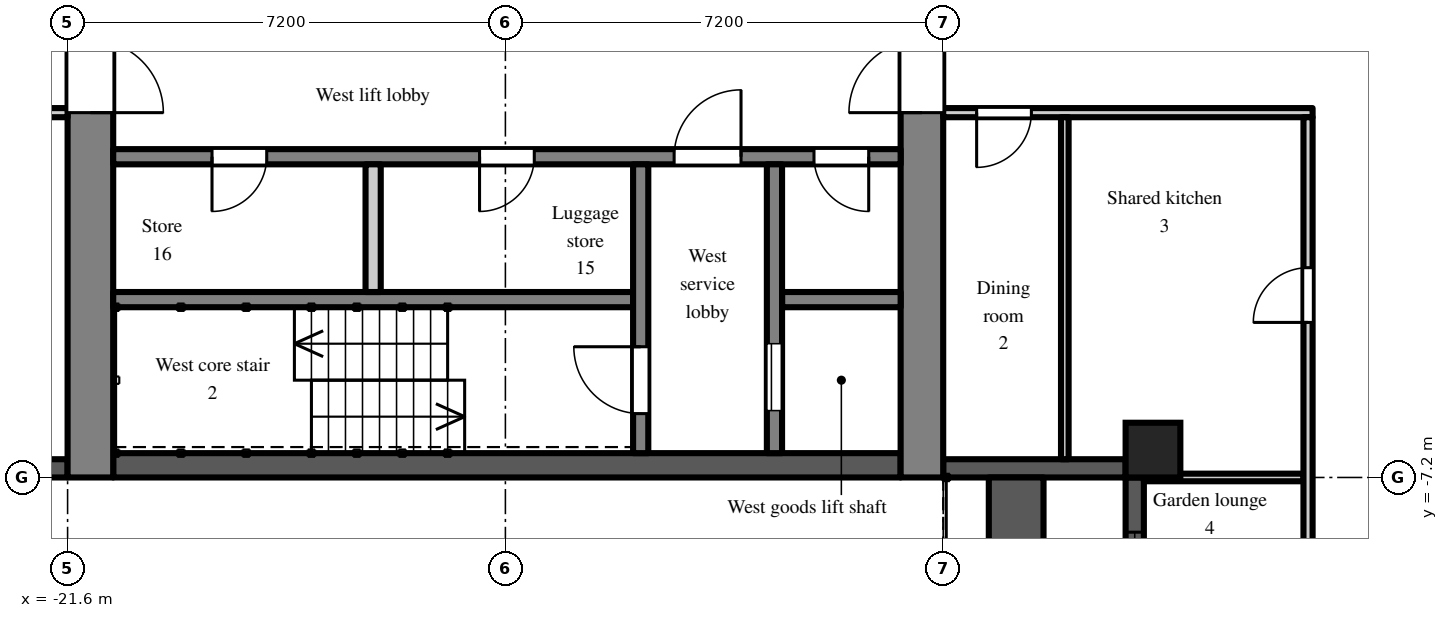
"""IFC4 building model, lengths in metres.
Left out: names, types, materials, properties, quantities, classifications, styles, units other than length and angle.
Written with IfcOpenShell. Run it as: python <this file> out.ifc"""

import sys

from ifc_helpers import new_model, si_unit, direction, frame, frame_2d, origin, origin_2d, place, context, subcontext, project, spatial, rectangle, extrude, element, fill, save


model = new_model("IFC4")
c1 = context("Model", 3, precision=1e-05, world=origin(), true_north=direction((0.0, 1.0)))
c2 = subcontext(c1, "Body", "Model", "MODEL_VIEW")
j1 = project(units=[si_unit("LENGTHUNIT", "METRE"), si_unit("PLANEANGLEUNIT", "RADIAN")], contexts=[c1])
p1 = place(None, origin())
s1 = spatial("IfcSite", under=j1, at=p1, CompositionType="ELEMENT")
p2 = place(p1, origin())
s2 = spatial("IfcBuilding", under=s1, at=p2, CompositionType="ELEMENT")
p3 = place(p2, frame((0.0, 0.0, 225.9)))
s3 = spatial("IfcBuildingStorey", under=s2, at=p3, CompositionType="ELEMENT", Elevation=225.9)
p4 = place(p3, frame((-3.75, -6.75, 0.0), z_axis=(0.0, 0.0, 1.0), x_axis=(1.0, 0.0, 0.0)))
e1 = element("IfcColumn", 1, at=p4, inside=s3, PredefinedType="COLUMN", context=c2, shape_type="SweptSolid", body=[
    extrude(rectangle(XDim=0.9, YDim=0.9, at=origin_2d()), origin(), (0.0, 0.0, 1.0), 3.0),
])
p5 = place(p3, frame((-24.3, -7.05, 0.0), z_axis=(0.0, 0.0, 1.0), x_axis=(1.0, 0.0, 0.0)))
e2 = element("IfcWall", 2, at=p5, inside=s3, PredefinedType="SOLIDWALL", context=c2, shape_type="SweptSolid", body=[
    extrude(rectangle(XDim=2.7, YDim=0.3, at=frame_2d((1.35, 0.0))), origin(), (0.0, 0.0, 1.0), 2.3),
])
p6 = place(p5, frame((0.75, 0.0, 0.2)))
e3 = element("IfcOpeningElement", 3, at=p6, cuts=e2, PredefinedType="OPENING", context=c2, shape_type="SweptSolid", body=[
    extrude(rectangle(XDim=1.2, YDim=1.85, at=frame_2d((0.6, 0.925))), frame((0.0, 0.16, 0.0), z_axis=(0.0, -1.0, 0.0), x_axis=(1.0, 0.0, 0.0)), (0.0, 0.0, 1.0), 0.32),
])
p7 = place(p3, frame((-7.2, -7.05, 0.0), z_axis=(0.0, 0.0, 1.0), x_axis=(1.0, 0.0, 0.0)))
e4 = element("IfcWall", 4, at=p7, inside=s3, PredefinedType="SOLIDWALL", context=c2, shape_type="SweptSolid", body=[
    extrude(rectangle(XDim=3.0, YDim=0.3, at=frame_2d((1.5, 0.0))), origin(), (0.0, 0.0, 1.0), 2.3),
])
p8 = place(p3, frame((-4.05, -7.2, 0.0), z_axis=(0.0, 0.0, 1.0), x_axis=(0.0, -1.0, 0.0)))
e5 = element("IfcWall", 5, at=p8, inside=s3, PredefinedType="SOLIDWALL", context=c2, shape_type="SweptSolid", body=[
    extrude(rectangle(XDim=7.2, YDim=0.3, at=frame_2d((3.6, 0.0))), origin(), (0.0, 0.0, 1.0), 2.3),
])
p9 = place(p8, frame((3.0, 0.0, 0.0)))
e6 = element("IfcOpeningElement", 6, at=p9, cuts=e5, PredefinedType="OPENING", context=c2, shape_type="SweptSolid", body=[
    extrude(rectangle(XDim=1.2, YDim=2.05, at=frame_2d((0.6, 1.025))), frame((0.0, 0.16, 0.0), z_axis=(0.0, -1.0, 0.0), x_axis=(1.0, 0.0, 0.0)), (0.0, 0.0, 1.0), 0.32),
])
p10 = place(p8, frame((0.9, 0.0, 0.2)))
e7 = element("IfcOpeningElement", 7, at=p10, cuts=e5, PredefinedType="OPENING", context=c2, shape_type="SweptSolid", body=[
    extrude(rectangle(XDim=1.8, YDim=1.85, at=frame_2d((0.9, 0.925))), frame((0.0, 0.16, 0.0), z_axis=(0.0, -1.0, 0.0), x_axis=(1.0, 0.0, 0.0)), (0.0, 0.0, 1.0), 0.32),
])
p11 = place(p8, frame((4.5, 0.0, 0.2)))
e8 = element("IfcOpeningElement", 8, at=p11, cuts=e5, PredefinedType="OPENING", context=c2, shape_type="SweptSolid", body=[
    extrude(rectangle(XDim=1.8, YDim=1.85, at=frame_2d((0.9, 0.925))), frame((0.0, 0.16, 0.0), z_axis=(0.0, -1.0, 0.0), x_axis=(1.0, 0.0, 0.0)), (0.0, 0.0, 1.0), 0.32),
])
p12 = place(p3, frame((-6.0, -14.4, 0.0), z_axis=(0.0, 0.0, 1.0), x_axis=(0.0, 1.0, 0.0)))
e9 = element("IfcWall", 9, at=p12, inside=s3, PredefinedType="PARAPET", context=c2, shape_type="SweptSolid", body=[
    extrude(rectangle(XDim=7.2, YDim=0.9, at=frame_2d((3.6, 0.0))), origin(), (0.0, 0.0, 1.0), 0.8),
])
p13 = place(p3, frame((-7.55, -7.2, 0.0), z_axis=(0.0, 0.0, 1.0), x_axis=(0.0, 1.0, 0.0)))
e10 = element("IfcWall", 10, at=p13, inside=s3, PredefinedType="SHEAR", context=c2, shape_type="SweptSolid", body=[
    extrude(rectangle(XDim=14.4, YDim=0.7, at=frame_2d((7.2, 0.0))), origin(), (0.0, 0.0, 1.0), 2.6),
])
p14 = place(p13, frame((6.0, 0.0, 0.0)))
e11 = element("IfcOpeningElement", 11, at=p14, cuts=e10, PredefinedType="OPENING", context=c2, shape_type="SweptSolid", body=[
    extrude(rectangle(XDim=2.4, YDim=2.2, at=frame_2d((1.2, 1.1))), frame((0.0, 0.36, 0.0), z_axis=(0.0, -1.0, 0.0), x_axis=(1.0, 0.0, 0.0)), (0.0, 0.0, 1.0), 0.72),
])
p15 = place(p3, frame((-21.225, -7.2, 0.0), z_axis=(0.0, 0.0, 1.0), x_axis=(0.0, 1.0, 0.0)))
e12 = element("IfcWall", 12, at=p15, inside=s3, PredefinedType="SHEAR", context=c2, shape_type="SweptSolid", body=[
    extrude(rectangle(XDim=14.4, YDim=0.75, at=frame_2d((7.2, 0.0))), origin(), (0.0, 0.0, 1.0), 2.6),
])
p16 = place(p15, frame((6.0, 0.0, 0.0)))
e13 = element("IfcOpeningElement", 13, at=p16, cuts=e12, PredefinedType="OPENING", context=c2, shape_type="SweptSolid", body=[
    extrude(rectangle(XDim=2.4, YDim=2.2, at=frame_2d((1.2, 1.1))), frame((0.0, 0.385, 0.0), z_axis=(0.0, -1.0, 0.0), x_axis=(1.0, 0.0, 0.0)), (0.0, 0.0, 1.0), 0.77),
])
p17 = place(p3, frame((-7.9, -7.0, 0.0), z_axis=(0.0, 0.0, 1.0), x_axis=(-1.0, 0.0, 0.0)))
e14 = element("IfcWall", 14, at=p17, inside=s3, PredefinedType="SHEAR", context=c2, shape_type="SweptSolid", body=[
    extrude(rectangle(XDim=12.95, YDim=0.4, at=frame_2d((6.475, 0.0))), origin(), (0.0, 0.0, 1.0), 2.6),
])
p18 = place(p3, frame((-7.9, -1.925, 0.0), z_axis=(0.0, 0.0, 1.0), x_axis=(-1.0, 0.0, 0.0)))
e15 = element("IfcWall", 15, at=p18, inside=s3, PredefinedType="SHEAR", context=c2, shape_type="SweptSolid", body=[
    extrude(rectangle(XDim=12.95, YDim=0.25, at=frame_2d((6.475, 0.0))), origin(), (0.0, 0.0, 1.0), 2.6),
])
p19 = place(p18, frame((0.525, 0.0, 0.0)))
e16 = element("IfcOpeningElement", 16, at=p19, cuts=e15, PredefinedType="OPENING", context=c2, shape_type="SweptSolid", body=[
    extrude(rectangle(XDim=0.9, YDim=2.1, at=frame_2d((0.45, 1.05))), frame((0.0, 0.135, 0.0), z_axis=(0.0, -1.0, 0.0), x_axis=(1.0, 0.0, 0.0)), (0.0, 0.0, 1.0), 0.27),
])
p20 = place(p18, frame((2.625, 0.0, 0.0)))
e17 = element("IfcOpeningElement", 17, at=p20, cuts=e15, PredefinedType="OPENING", context=c2, shape_type="SweptSolid", body=[
    extrude(rectangle(XDim=1.1, YDim=2.1, at=frame_2d((0.55, 1.05))), frame((0.0, 0.135, 0.0), z_axis=(0.0, -1.0, 0.0), x_axis=(1.0, 0.0, 0.0)), (0.0, 0.0, 1.0), 0.27),
])
p21 = place(p18, frame((6.025, 0.0, 0.0)))
e18 = element("IfcOpeningElement", 18, at=p21, cuts=e15, PredefinedType="OPENING", context=c2, shape_type="SweptSolid", body=[
    extrude(rectangle(XDim=0.9, YDim=2.1, at=frame_2d((0.45, 1.05))), frame((0.0, 0.135, 0.0), z_axis=(0.0, -1.0, 0.0), x_axis=(1.0, 0.0, 0.0)), (0.0, 0.0, 1.0), 0.27),
])
p22 = place(p18, frame((10.425, 0.0, 0.0)))
e19 = element("IfcOpeningElement", 19, at=p22, cuts=e15, PredefinedType="OPENING", context=c2, shape_type="SweptSolid", body=[
    extrude(rectangle(XDim=0.9, YDim=2.1, at=frame_2d((0.45, 1.05))), frame((0.0, 0.135, 0.0), z_axis=(0.0, -1.0, 0.0), x_axis=(1.0, 0.0, 0.0)), (0.0, 0.0, 1.0), 0.27),
])
p23 = place(p3, frame((-7.9, -4.275, 0.0), z_axis=(0.0, 0.0, 1.0), x_axis=(-1.0, 0.0, 0.0)))
e20 = element("IfcWall", 20, at=p23, inside=s3, PredefinedType="SHEAR", context=c2, shape_type="SweptSolid", body=[
    extrude(rectangle(XDim=1.95, YDim=0.25, at=frame_2d((0.975, 0.0))), origin(), (0.0, 0.0, 1.0), 2.6),
])
p24 = place(p3, frame((-12.3, -4.275, 0.0), z_axis=(0.0, 0.0, 1.0), x_axis=(-1.0, 0.0, 0.0)))
e21 = element("IfcWall", 21, at=p24, inside=s3, PredefinedType="SHEAR", context=c2, shape_type="SweptSolid", body=[
    extrude(rectangle(XDim=8.55, YDim=0.25, at=frame_2d((4.275, 0.0))), origin(), (0.0, 0.0, 1.0), 2.6),
])
p25 = place(p3, frame((-9.975, -2.05, 0.0), z_axis=(0.0, 0.0, 1.0), x_axis=(0.0, -1.0, 0.0)))
e22 = element("IfcWall", 22, at=p25, inside=s3, PredefinedType="SHEAR", context=c2, shape_type="SweptSolid", body=[
    extrude(rectangle(XDim=4.75, YDim=0.25, at=frame_2d((2.375, 0.0))), origin(), (0.0, 0.0, 1.0), 2.6),
])
p26 = place(p25, frame((2.95, 0.0, 0.0)))
e23 = element("IfcOpeningElement", 23, at=p26, cuts=e22, PredefinedType="OPENING", context=c2, shape_type="SweptSolid", body=[
    extrude(rectangle(XDim=1.1, YDim=2.1, at=frame_2d((0.55, 1.05))), frame((0.0, 0.135, 0.0), z_axis=(0.0, -1.0, 0.0), x_axis=(1.0, 0.0, 0.0)), (0.0, 0.0, 1.0), 0.27),
])
p27 = place(p3, frame((-12.175, -2.05, 0.0), z_axis=(0.0, 0.0, 1.0), x_axis=(0.0, -1.0, 0.0)))
e24 = element("IfcWall", 24, at=p27, inside=s3, PredefinedType="SHEAR", context=c2, shape_type="SweptSolid", body=[
    extrude(rectangle(XDim=4.75, YDim=0.25, at=frame_2d((2.375, 0.0))), origin(), (0.0, 0.0, 1.0), 2.6),
])
p28 = place(p27, frame((3.0, 0.0, 0.0)))
e25 = element("IfcOpeningElement", 25, at=p28, cuts=e24, PredefinedType="OPENING", context=c2, shape_type="SweptSolid", body=[
    extrude(rectangle(XDim=1.1, YDim=2.1, at=frame_2d((0.55, 1.05))), frame((0.0, 0.135, 0.0), z_axis=(0.0, -1.0, 0.0), x_axis=(1.0, 0.0, 0.0)), (0.0, 0.0, 1.0), 0.27),
])
p29 = place(p3, frame((-16.575, -2.05, 0.0), z_axis=(0.0, 0.0, 1.0), x_axis=(0.0, -1.0, 0.0)))
e26 = element("IfcWall", 26, at=p29, inside=s3, PredefinedType="PARTITIONING", context=c2, shape_type="SweptSolid", body=[
    extrude(rectangle(XDim=2.1, YDim=0.25, at=frame_2d((1.05, 0.0))), origin(), (0.0, 0.0, 1.0), 2.6),
])
p30 = place(p3, frame((-26.725, -1.2, 0.0), z_axis=(0.0, 0.0, 1.0), x_axis=(1.0, 0.0, 0.0)))
e27 = element("IfcWall", 27, at=p30, inside=s3, PredefinedType="PARTITIONING", context=c2, shape_type="SweptSolid", body=[
    extrude(rectangle(XDim=5.125, YDim=0.15, at=frame_2d((2.562, 0.0))), origin(), (0.0, 0.0, 1.0), 2.6),
])
p31 = place(p30, frame((3.525, 0.0, 0.0)))
e28 = element("IfcOpeningElement", 28, at=p31, cuts=e27, PredefinedType="OPENING", context=c2, shape_type="SweptSolid", body=[
    extrude(rectangle(XDim=1.0, YDim=2.1, at=frame_2d((0.5, 1.05))), frame((0.0, 0.085, 0.0), z_axis=(0.0, -1.0, 0.0), x_axis=(1.0, 0.0, 0.0)), (0.0, 0.0, 1.0), 0.17),
])
p32 = place(p30, frame((0.275, 0.0, 0.0)))
e29 = element("IfcOpeningElement", 29, at=p32, cuts=e27, PredefinedType="OPENING", context=c2, shape_type="SweptSolid", body=[
    extrude(rectangle(XDim=0.9, YDim=2.1, at=frame_2d((0.45, 1.05))), frame((0.0, 0.085, 0.0), z_axis=(0.0, -1.0, 0.0), x_axis=(1.0, 0.0, 0.0)), (0.0, 0.0, 1.0), 0.17),
])
p33 = place(p3, frame((-7.2, -1.2, 0.0), z_axis=(0.0, 0.0, 1.0), x_axis=(1.0, 0.0, 0.0)))
e30 = element("IfcWall", 30, at=p33, inside=s3, PredefinedType="PARTITIONING", context=c2, shape_type="SweptSolid", body=[
    extrude(rectangle(XDim=6.075, YDim=0.15, at=frame_2d((3.038, 0.0))), origin(), (0.0, 0.0, 1.0), 2.6),
])
p34 = place(p33, frame((0.55, 0.0, 0.0)))
e31 = element("IfcOpeningElement", 31, at=p34, cuts=e30, PredefinedType="OPENING", context=c2, shape_type="SweptSolid", body=[
    extrude(rectangle(XDim=0.9, YDim=2.1, at=frame_2d((0.45, 1.05))), frame((0.0, 0.085, 0.0), z_axis=(0.0, -1.0, 0.0), x_axis=(1.0, 0.0, 0.0)), (0.0, 0.0, 1.0), 0.17),
])
p35 = place(p3, frame((-5.2, -6.9, 0.0), z_axis=(0.0, 0.0, 1.0), x_axis=(0.0, 1.0, 0.0)))
e32 = element("IfcWall", 32, at=p35, inside=s3, PredefinedType="PARTITIONING", context=c2, shape_type="SweptSolid", body=[
    extrude(rectangle(XDim=5.625, YDim=0.125, at=frame_2d((2.812, 0.0))), origin(), (0.0, 0.0, 1.0), 2.6),
])
p36 = place(p3, frame((-3.9, -7.2, 0.0), z_axis=(0.0, 0.0, 1.0), x_axis=(1.0, 0.0, 0.0)))
e33 = element("IfcWall", 33, at=p36, inside=s3, PredefinedType="PARTITIONING", context=c2, shape_type="SweptSolid", body=[
    extrude(rectangle(XDim=2.625, YDim=0.125, at=frame_2d((1.312, 0.0))), origin(), (0.0, 0.0, 1.0), 2.6),
])
p37 = place(p3, frame((-1.2, -19.525, 0.0), z_axis=(0.0, 0.0, 1.0), x_axis=(0.0, 1.0, 0.0)))
e34 = element("IfcWall", 34, at=p37, inside=s3, PredefinedType="PARTITIONING", context=c2, shape_type="SweptSolid", body=[
    extrude(rectangle(XDim=18.25, YDim=0.15, at=frame_2d((9.125, 0.0))), origin(), (0.0, 0.0, 1.0), 2.6),
])
p38 = place(p37, frame((14.875, 0.0, 0.0)))
e35 = element("IfcOpeningElement", 35, at=p38, cuts=e34, PredefinedType="OPENING", context=c2, shape_type="SweptSolid", body=[
    extrude(rectangle(XDim=0.9, YDim=2.1, at=frame_2d((0.45, 1.05))), frame((0.0, 0.085, 0.0), z_axis=(0.0, -1.0, 0.0), x_axis=(1.0, 0.0, 0.0)), (0.0, 0.0, 1.0), 0.17),
])
p39 = place(p37, frame((10.075, 0.0, 0.0)))
e36 = element("IfcOpeningElement", 36, at=p39, cuts=e34, PredefinedType="OPENING", context=c2, shape_type="SweptSolid", body=[
    extrude(rectangle(XDim=0.9, YDim=2.1, at=frame_2d((0.45, 1.05))), frame((0.0, 0.085, 0.0), z_axis=(0.0, -1.0, 0.0), x_axis=(1.0, 0.0, 0.0)), (0.0, 0.0, 1.0), 0.17),
])
p40 = place(p37, frame((3.925, 0.0, 0.0)))
e37 = element("IfcOpeningElement", 37, at=p40, cuts=e34, PredefinedType="OPENING", context=c2, shape_type="SweptSolid", body=[
    extrude(rectangle(XDim=1.0, YDim=2.1, at=frame_2d((0.5, 1.05))), frame((0.0, 0.085, 0.0), z_axis=(0.0, -1.0, 0.0), x_axis=(1.0, 0.0, 0.0)), (0.0, 0.0, 1.0), 0.17),
])
p41 = place(p37, frame((0.275, 0.0, 0.0)))
e38 = element("IfcOpeningElement", 38, at=p41, cuts=e34, PredefinedType="OPENING", context=c2, shape_type="SweptSolid", body=[
    extrude(rectangle(XDim=0.9, YDim=2.1, at=frame_2d((0.45, 1.05))), frame((0.0, 0.085, 0.0), z_axis=(0.0, -1.0, 0.0), x_axis=(1.0, 0.0, 0.0)), (0.0, 0.0, 1.0), 0.17),
])
p42 = place(p10, origin())
e39 = element("IfcWindow", 39, at=p42, inside=s3, PartitioningType="SINGLE_PANEL", PredefinedType="WINDOW", context=c2, shape_type="SweptSolid", body=[
    extrude(rectangle(XDim=1.8, YDim=1.85, at=frame_2d((0.9, 0.925))), frame((0.0, 0.03, 0.0), z_axis=(0.0, -1.0, 0.0), x_axis=(1.0, 0.0, 0.0)), (0.0, 0.0, 1.0), 0.06),
])
fill(e7, e39)
p43 = place(p26, origin())
e40 = element("IfcDoor", 40, at=p43, inside=s3, OperationType="SLIDING_TO_LEFT", PredefinedType="DOOR", context=c2, shape_type="SweptSolid", body=[
    extrude(rectangle(XDim=1.1, YDim=2.1, at=frame_2d((0.55, 1.05))), frame((0.0, 0.025, 0.0), z_axis=(0.0, -1.0, 0.0), x_axis=(1.0, 0.0, 0.0)), (0.0, 0.0, 1.0), 0.05),
])
fill(e23, e40)
p44 = place(p28, frame((1.1, 0.0, 0.0), z_axis=(0.0, 0.0, 1.0), x_axis=(-1.0, 0.0, 0.0)))
e41 = element("IfcDoor", 41, at=p44, inside=s3, OperationType="SINGLE_SWING_RIGHT", PredefinedType="DOOR", context=c2, shape_type="SweptSolid", body=[
    extrude(rectangle(XDim=1.1, YDim=2.1, at=frame_2d((0.55, 1.05))), frame((0.0, 0.025, 0.0), z_axis=(0.0, -1.0, 0.0), x_axis=(1.0, 0.0, 0.0)), (0.0, 0.0, 1.0), 0.05),
])
fill(e25, e41)
p45 = place(p19, origin())
e42 = element("IfcDoor", 42, at=p45, inside=s3, OperationType="SINGLE_SWING_LEFT", PredefinedType="DOOR", context=c2, shape_type="SweptSolid", body=[
    extrude(rectangle(XDim=0.9, YDim=2.1, at=frame_2d((0.45, 1.05))), frame((0.0, 0.025, 0.0), z_axis=(0.0, -1.0, 0.0), x_axis=(1.0, 0.0, 0.0)), (0.0, 0.0, 1.0), 0.05),
])
fill(e16, e42)
p46 = place(p20, frame((1.1, 0.0, 0.0), z_axis=(0.0, 0.0, 1.0), x_axis=(-1.0, 0.0, 0.0)))
e43 = element("IfcDoor", 43, at=p46, inside=s3, OperationType="SINGLE_SWING_RIGHT", PredefinedType="DOOR", context=c2, shape_type="SweptSolid", body=[
    extrude(rectangle(XDim=1.1, YDim=2.1, at=frame_2d((0.55, 1.05))), frame((0.0, 0.025, 0.0), z_axis=(0.0, -1.0, 0.0), x_axis=(1.0, 0.0, 0.0)), (0.0, 0.0, 1.0), 0.05),
])
fill(e17, e43)
p47 = place(p14, origin())
e44 = element("IfcDoor", 44, at=p47, inside=s3, OperationType="DOUBLE_DOOR_DOUBLE_SWING", PredefinedType="DOOR", context=c2, shape_type="SweptSolid", body=[
    extrude(rectangle(XDim=2.4, YDim=2.2, at=frame_2d((1.2, 1.1))), frame((0.0, 0.025, 0.0), z_axis=(0.0, -1.0, 0.0), x_axis=(1.0, 0.0, 0.0)), (0.0, 0.0, 1.0), 0.05),
])
fill(e11, e44)
p48 = place(p16, frame((2.4, 0.0, 0.0), z_axis=(0.0, 0.0, 1.0), x_axis=(-1.0, 0.0, 0.0)))
e45 = element("IfcDoor", 45, at=p48, inside=s3, OperationType="DOUBLE_DOOR_DOUBLE_SWING", PredefinedType="DOOR", context=c2, shape_type="SweptSolid", body=[
    extrude(rectangle(XDim=2.4, YDim=2.2, at=frame_2d((1.2, 1.1))), frame((0.0, 0.025, 0.0), z_axis=(0.0, -1.0, 0.0), x_axis=(1.0, 0.0, 0.0)), (0.0, 0.0, 1.0), 0.05),
])
fill(e13, e45)
p49 = place(p21, origin())
e46 = element("IfcDoor", 46, at=p49, inside=s3, OperationType="SINGLE_SWING_RIGHT", PredefinedType="DOOR", context=c2, shape_type="SweptSolid", body=[
    extrude(rectangle(XDim=0.9, YDim=2.1, at=frame_2d((0.45, 1.05))), frame((0.0, 0.025, 0.0), z_axis=(0.0, -1.0, 0.0), x_axis=(1.0, 0.0, 0.0)), (0.0, 0.0, 1.0), 0.05),
])
fill(e18, e46)
p50 = place(p22, origin())
e47 = element("IfcDoor", 47, at=p50, inside=s3, OperationType="SINGLE_SWING_RIGHT", PredefinedType="DOOR", context=c2, shape_type="SweptSolid", body=[
    extrude(rectangle(XDim=0.9, YDim=2.1, at=frame_2d((0.45, 1.05))), frame((0.0, 0.025, 0.0), z_axis=(0.0, -1.0, 0.0), x_axis=(1.0, 0.0, 0.0)), (0.0, 0.0, 1.0), 0.05),
])
fill(e19, e47)
p51 = place(p38, origin())
e48 = element("IfcDoor", 48, at=p51, inside=s3, OperationType="SINGLE_SWING_LEFT", PredefinedType="DOOR", context=c2, shape_type="SweptSolid", body=[
    extrude(rectangle(XDim=0.9, YDim=2.1, at=frame_2d((0.45, 1.05))), frame((0.0, 0.025, 0.0), z_axis=(0.0, -1.0, 0.0), x_axis=(1.0, 0.0, 0.0)), (0.0, 0.0, 1.0), 0.05),
])
fill(e35, e48)
p52 = place(p34, frame((0.9, 0.0, 0.0), z_axis=(0.0, 0.0, 1.0), x_axis=(-1.0, 0.0, 0.0)))
e49 = element("IfcDoor", 49, at=p52, inside=s3, OperationType="SINGLE_SWING_RIGHT", PredefinedType="DOOR", context=c2, shape_type="SweptSolid", body=[
    extrude(rectangle(XDim=0.9, YDim=2.1, at=frame_2d((0.45, 1.05))), frame((0.0, 0.025, 0.0), z_axis=(0.0, -1.0, 0.0), x_axis=(1.0, 0.0, 0.0)), (0.0, 0.0, 1.0), 0.05),
])
fill(e31, e49)
save(model, sys.argv[1])
